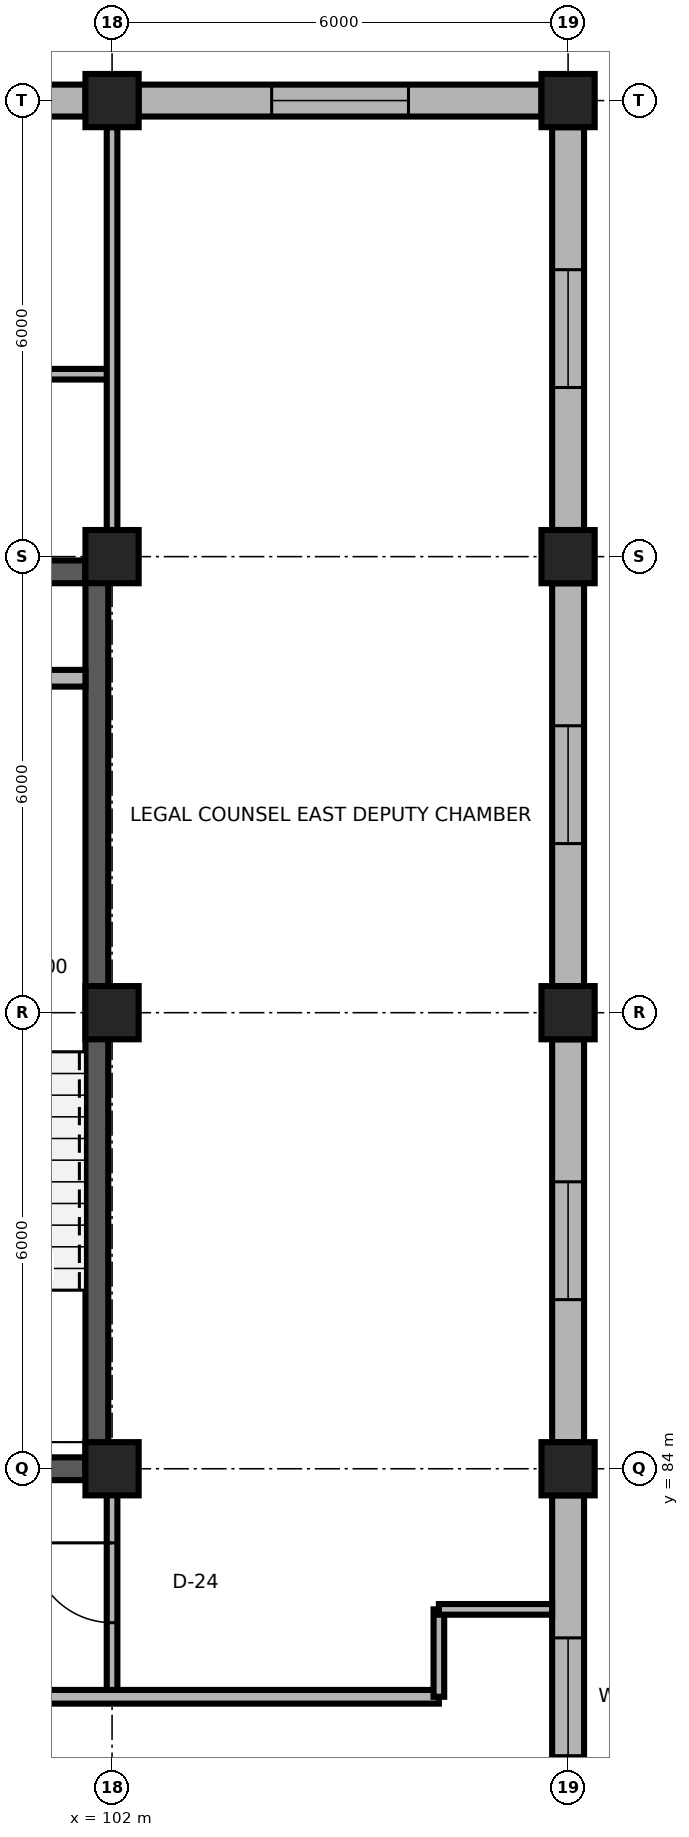
"""IFC4 building model, lengths in metres.
Left out: names, types, materials, properties, quantities, classifications, styles, units other than length and angle.
Written with IfcOpenShell. Run it as: python <this file> out.ifc"""

import sys

from ifc_helpers import new_model, si_unit, direction, frame, frame_2d, origin, origin_2d, place, context, subcontext, project, spatial, rectangle, extrude, element, fill, save


model = new_model("IFC4")
c1 = context("Model", 3, precision=1e-05, world=origin(), true_north=direction((0.0, 1.0)))
c2 = subcontext(c1, "Body", "Model", "MODEL_VIEW")
j1 = project(units=[si_unit("LENGTHUNIT", "METRE"), si_unit("PLANEANGLEUNIT", "RADIAN")], contexts=[c1])
p1 = place(None, origin())
s1 = spatial("IfcSite", under=j1, at=p1, CompositionType="ELEMENT")
p2 = place(p1, origin())
s2 = spatial("IfcBuilding", under=s1, at=p2, CompositionType="ELEMENT")
p3 = place(p2, frame((0.0, 0.0, 60.0)))
s3 = spatial("IfcBuildingStorey", under=s2, at=p3, CompositionType="ELEMENT", Elevation=60.0)
for number, where, z_axis, x_axis in (
    (1, (102.0, 84.0, 0.0), (0.0, 0.0, 1.0), (1.0, 0.0, 0.0)),
    (2, (108.0, 84.0, 0.0), (0.0, 0.0, 1.0), (1.0, 0.0, 0.0)),
    (3, (102.0, 90.0, 0.0), (0.0, 0.0, 1.0), (1.0, 0.0, 0.0)),
    (4, (108.0, 90.0, 0.0), (0.0, 0.0, 1.0), (1.0, 0.0, 0.0)),
    (5, (102.0, 96.0, 0.0), (0.0, 0.0, 1.0), (1.0, 0.0, 0.0)),
    (6, (108.0, 96.0, 0.0), (0.0, 0.0, 1.0), (1.0, 0.0, 0.0)),
    (7, (102.0, 102.0, 0.0), (0.0, 0.0, 1.0), (1.0, 0.0, 0.0)),
    (8, (108.0, 102.0, 0.0), (0.0, 0.0, 1.0), (1.0, 0.0, 0.0)),
):
    element("IfcColumn", number, at=place(p3, frame(where, z_axis=z_axis, x_axis=x_axis)), inside=s3, PredefinedType="COLUMN", context=c2, shape_type="SweptSolid", body=[
        extrude(rectangle(XDim=0.7, YDim=0.7, at=origin_2d()), origin(), (0.0, 0.0, 1.0), 3.9),
    ])
p4 = place(p3, frame((96.35, 102.0, 0.0), z_axis=(0.0, 0.0, 1.0), x_axis=(1.0, 0.0, 0.0)))
e9 = element("IfcWall", 9, at=p4, inside=s3, PredefinedType="SOLIDWALL", context=c2, shape_type="SweptSolid", body=[
    extrude(rectangle(XDim=5.3, YDim=0.42, at=frame_2d((2.65, 0.0))), origin(), (0.0, 0.0, 1.0), 3.32),
])
p5 = place(p4, frame((1.75, 0.0, 0.85)))
e10 = element("IfcOpeningElement", 10, at=p5, cuts=e9, PredefinedType="OPENING", context=c2, shape_type="SweptSolid", body=[
    extrude(rectangle(XDim=1.8, YDim=1.95, at=frame_2d((0.9, 0.975))), frame((0.0, 0.225, 0.0), z_axis=(0.0, -1.0, 0.0), x_axis=(1.0, 0.0, 0.0)), (0.0, 0.0, 1.0), 0.45),
])
p6 = place(p3, frame((102.35, 102.0, 0.0), z_axis=(0.0, 0.0, 1.0), x_axis=(1.0, 0.0, 0.0)))
e11 = element("IfcWall", 11, at=p6, inside=s3, PredefinedType="SOLIDWALL", context=c2, shape_type="SweptSolid", body=[
    extrude(rectangle(XDim=5.3, YDim=0.42, at=frame_2d((2.65, 0.0))), origin(), (0.0, 0.0, 1.0), 3.32),
])
p7 = place(p6, frame((1.75, 0.0, 0.85)))
e12 = element("IfcOpeningElement", 12, at=p7, cuts=e11, PredefinedType="OPENING", context=c2, shape_type="SweptSolid", body=[
    extrude(rectangle(XDim=1.8, YDim=1.95, at=frame_2d((0.9, 0.975))), frame((0.0, 0.225, 0.0), z_axis=(0.0, -1.0, 0.0), x_axis=(1.0, 0.0, 0.0)), (0.0, 0.0, 1.0), 0.45),
])
p8 = place(p3, frame((108.0, 78.35, 0.0), z_axis=(0.0, 0.0, 1.0), x_axis=(0.0, 1.0, 0.0)))
e13 = element("IfcWall", 13, at=p8, inside=s3, PredefinedType="SOLIDWALL", context=c2, shape_type="SweptSolid", body=[
    extrude(rectangle(XDim=5.3, YDim=0.42, at=frame_2d((2.65, 0.0))), origin(), (0.0, 0.0, 1.0), 3.32),
])
p9 = place(p8, frame((1.875, 0.0, 0.85)))
e14 = element("IfcOpeningElement", 14, at=p9, cuts=e13, PredefinedType="OPENING", context=c2, shape_type="SweptSolid", body=[
    extrude(rectangle(XDim=1.55, YDim=1.9, at=frame_2d((0.775, 0.95))), frame((0.0, 0.225, 0.0), z_axis=(0.0, -1.0, 0.0), x_axis=(1.0, 0.0, 0.0)), (0.0, 0.0, 1.0), 0.45),
])
p10 = place(p3, frame((108.0, 84.35, 0.0), z_axis=(0.0, 0.0, 1.0), x_axis=(0.0, 1.0, 0.0)))
e15 = element("IfcWall", 15, at=p10, inside=s3, PredefinedType="SOLIDWALL", context=c2, shape_type="SweptSolid", body=[
    extrude(rectangle(XDim=5.3, YDim=0.42, at=frame_2d((2.65, 0.0))), origin(), (0.0, 0.0, 1.0), 3.32),
])
p11 = place(p10, frame((1.875, 0.0, 0.85)))
e16 = element("IfcOpeningElement", 16, at=p11, cuts=e15, PredefinedType="OPENING", context=c2, shape_type="SweptSolid", body=[
    extrude(rectangle(XDim=1.55, YDim=1.9, at=frame_2d((0.775, 0.95))), frame((0.0, 0.225, 0.0), z_axis=(0.0, -1.0, 0.0), x_axis=(1.0, 0.0, 0.0)), (0.0, 0.0, 1.0), 0.45),
])
p12 = place(p3, frame((108.0, 90.35, 0.0), z_axis=(0.0, 0.0, 1.0), x_axis=(0.0, 1.0, 0.0)))
e17 = element("IfcWall", 17, at=p12, inside=s3, PredefinedType="SOLIDWALL", context=c2, shape_type="SweptSolid", body=[
    extrude(rectangle(XDim=5.3, YDim=0.42, at=frame_2d((2.65, 0.0))), origin(), (0.0, 0.0, 1.0), 3.32),
])
p13 = place(p12, frame((1.875, 0.0, 0.85)))
e18 = element("IfcOpeningElement", 18, at=p13, cuts=e17, PredefinedType="OPENING", context=c2, shape_type="SweptSolid", body=[
    extrude(rectangle(XDim=1.55, YDim=1.9, at=frame_2d((0.775, 0.95))), frame((0.0, 0.225, 0.0), z_axis=(0.0, -1.0, 0.0), x_axis=(1.0, 0.0, 0.0)), (0.0, 0.0, 1.0), 0.45),
])
p14 = place(p3, frame((108.0, 96.35, 0.0), z_axis=(0.0, 0.0, 1.0), x_axis=(0.0, 1.0, 0.0)))
e19 = element("IfcWall", 19, at=p14, inside=s3, PredefinedType="SOLIDWALL", context=c2, shape_type="SweptSolid", body=[
    extrude(rectangle(XDim=5.3, YDim=0.42, at=frame_2d((2.65, 0.0))), origin(), (0.0, 0.0, 1.0), 3.32),
])
p15 = place(p14, frame((1.875, 0.0, 0.85)))
e20 = element("IfcOpeningElement", 20, at=p15, cuts=e19, PredefinedType="OPENING", context=c2, shape_type="SweptSolid", body=[
    extrude(rectangle(XDim=1.55, YDim=1.9, at=frame_2d((0.775, 0.95))), frame((0.0, 0.225, 0.0), z_axis=(0.0, -1.0, 0.0), x_axis=(1.0, 0.0, 0.0)), (0.0, 0.0, 1.0), 0.45),
])
p16 = place(p3, frame((96.35, 84.0, 0.0), z_axis=(0.0, 0.0, 1.0), x_axis=(1.0, 0.0, 0.0)))
e21 = element("IfcWall", 21, at=p16, inside=s3, PredefinedType="SHEAR", context=c2, shape_type="SweptSolid", body=[
    extrude(rectangle(XDim=5.3, YDim=0.3, at=frame_2d((2.65, 0.0))), origin(), (0.0, 0.0, 1.0), 3.66),
])
p17 = place(p16, frame((1.975, 0.0, 0.0)))
e22 = element("IfcOpeningElement", 22, at=p17, cuts=e21, PredefinedType="OPENING", context=c2, shape_type="SweptSolid", body=[
    extrude(rectangle(XDim=1.35, YDim=2.2, at=frame_2d((0.675, 1.1))), frame((0.0, 0.165, 0.0), z_axis=(0.0, -1.0, 0.0), x_axis=(1.0, 0.0, 0.0)), (0.0, 0.0, 1.0), 0.33),
])
p18 = place(p3, frame((96.35, 95.8, 0.0), z_axis=(0.0, 0.0, 1.0), x_axis=(1.0, 0.0, 0.0)))
e23 = element("IfcWall", 23, at=p18, inside=s3, PredefinedType="SHEAR", context=c2, shape_type="SweptSolid", body=[
    extrude(rectangle(XDim=5.3, YDim=0.3, at=frame_2d((2.65, 0.0))), origin(), (0.0, 0.0, 1.0), 3.74),
])
p19 = place(p3, frame((101.8, 84.0, 0.0), z_axis=(0.0, 0.0, 1.0), x_axis=(0.0, 1.0, 0.0)))
e24 = element("IfcWall", 24, at=p19, inside=s3, PredefinedType="SHEAR", context=c2, shape_type="SweptSolid", body=[
    extrude(rectangle(XDim=11.8, YDim=0.3, at=frame_2d((5.9, 0.0))), origin(), (0.0, 0.0, 1.0), 3.74),
])
p20 = place(p3, frame((100.55, 94.4, 0.0), z_axis=(0.0, 0.0, 1.0), x_axis=(1.0, 0.0, 0.0)))
e25 = element("IfcWall", 25, at=p20, inside=s3, PredefinedType="PARTITIONING", context=c2, shape_type="SweptSolid", body=[
    extrude(rectangle(XDim=1.1, YDim=0.22, at=frame_2d((0.55, 0.0))), origin(), (0.0, 0.0, 1.0), 3.74),
])
p21 = place(p3, frame((102.0, 81.05, 0.0), z_axis=(0.0, 0.0, 1.0), x_axis=(0.0, 1.0, 0.0)))
e26 = element("IfcWall", 26, at=p21, inside=s3, PredefinedType="PARTITIONING", context=c2, shape_type="SweptSolid", body=[
    extrude(rectangle(XDim=2.9, YDim=0.14, at=frame_2d((1.45, 0.0))), origin(), (0.0, 0.0, 1.0), 3.449),
])
p22 = place(p21, frame((0.925, 0.0, 0.0)))
e27 = element("IfcOpeningElement", 27, at=p22, cuts=e26, PredefinedType="OPENING", context=c2, shape_type="SweptSolid", body=[
    extrude(rectangle(XDim=1.05, YDim=2.25, at=frame_2d((0.525, 1.125))), frame((0.0, 0.085, 0.0), z_axis=(0.0, -1.0, 0.0), x_axis=(1.0, 0.0, 0.0)), (0.0, 0.0, 1.0), 0.17),
])
p23 = place(p3, frame((96.0, 98.4, 0.0), z_axis=(0.0, 0.0, 1.0), x_axis=(1.0, 0.0, 0.0)))
e28 = element("IfcWall", 28, at=p23, inside=s3, PredefinedType="PARTITIONING", context=c2, shape_type="SweptSolid", body=[
    extrude(rectangle(XDim=6.0, YDim=0.14, at=frame_2d((3.0, 0.0))), origin(), (0.0, 0.0, 1.0), 3.74),
])
p24 = place(p23, frame((2.54, 0.0, 0.0)))
e29 = element("IfcOpeningElement", 29, at=p24, cuts=e28, PredefinedType="OPENING", context=c2, shape_type="SweptSolid", body=[
    extrude(rectangle(XDim=0.92, YDim=2.15, at=frame_2d((0.46, 1.075))), frame((0.0, 0.085, 0.0), z_axis=(0.0, -1.0, 0.0), x_axis=(1.0, 0.0, 0.0)), (0.0, 0.0, 1.0), 0.17),
])
p25 = place(p3, frame((96.0, 81.0, 0.0), z_axis=(0.0, 0.0, 1.0), x_axis=(1.0, 0.0, 0.0)))
e30 = element("IfcWall", 30, at=p25, inside=s3, PredefinedType="PARTITIONING", context=c2, shape_type="SweptSolid", body=[
    extrude(rectangle(XDim=10.3, YDim=0.18, at=frame_2d((5.15, 0.0))), origin(), (0.0, 0.0, 1.0), 3.74),
])
p26 = place(p3, frame((106.3, 81.0, 0.0), z_axis=(0.0, 0.0, 1.0), x_axis=(0.0, 1.0, 0.0)))
e31 = element("IfcWall", 31, at=p26, inside=s3, PredefinedType="PARTITIONING", context=c2, shape_type="SweptSolid", body=[
    extrude(rectangle(XDim=1.15, YDim=0.14, at=frame_2d((0.575, 0.0))), origin(), (0.0, 0.0, 1.0), 3.74),
])
p27 = place(p3, frame((106.3, 82.15, 0.0), z_axis=(0.0, 0.0, 1.0), x_axis=(1.0, 0.0, 0.0)))
e32 = element("IfcWall", 32, at=p27, inside=s3, PredefinedType="PARTITIONING", context=c2, shape_type="SweptSolid", body=[
    extrude(rectangle(XDim=1.49, YDim=0.14, at=frame_2d((0.745, 0.0))), origin(), (0.0, 0.0, 1.0), 3.74),
])
p28 = place(p3, frame((102.0, 96.35, 0.0), z_axis=(0.0, 0.0, 1.0), x_axis=(0.0, 1.0, 0.0)))
e33 = element("IfcWall", 33, at=p28, inside=s3, PredefinedType="PARTITIONING", context=c2, shape_type="SweptSolid", body=[
    extrude(rectangle(XDim=5.3, YDim=0.14, at=frame_2d((2.65, 0.0))), origin(), (0.0, 0.0, 1.0), 3.449),
])
p29 = place(p7, origin())
e34 = element("IfcWindow", 34, at=p29, inside=s3, PartitioningType="SINGLE_PANEL", PredefinedType="WINDOW", context=c2, shape_type="SweptSolid", body=[
    extrude(rectangle(XDim=1.8, YDim=1.95, at=frame_2d((0.9, 0.975))), frame((0.0, 0.03, 0.0), z_axis=(0.0, -1.0, 0.0), x_axis=(1.0, 0.0, 0.0)), (0.0, 0.0, 1.0), 0.06),
])
fill(e12, e34)
p30 = place(p9, origin())
e35 = element("IfcWindow", 35, at=p30, inside=s3, PartitioningType="SINGLE_PANEL", PredefinedType="WINDOW", context=c2, shape_type="SweptSolid", body=[
    extrude(rectangle(XDim=1.55, YDim=1.9, at=frame_2d((0.775, 0.95))), frame((0.0, 0.03, 0.0), z_axis=(0.0, -1.0, 0.0), x_axis=(1.0, 0.0, 0.0)), (0.0, 0.0, 1.0), 0.06),
])
fill(e14, e35)
p31 = place(p11, origin())
e36 = element("IfcWindow", 36, at=p31, inside=s3, PartitioningType="SINGLE_PANEL", PredefinedType="WINDOW", context=c2, shape_type="SweptSolid", body=[
    extrude(rectangle(XDim=1.55, YDim=1.9, at=frame_2d((0.775, 0.95))), frame((0.0, 0.03, 0.0), z_axis=(0.0, -1.0, 0.0), x_axis=(1.0, 0.0, 0.0)), (0.0, 0.0, 1.0), 0.06),
])
fill(e16, e36)
p32 = place(p13, origin())
e37 = element("IfcWindow", 37, at=p32, inside=s3, PartitioningType="SINGLE_PANEL", PredefinedType="WINDOW", context=c2, shape_type="SweptSolid", body=[
    extrude(rectangle(XDim=1.55, YDim=1.9, at=frame_2d((0.775, 0.95))), frame((0.0, 0.03, 0.0), z_axis=(0.0, -1.0, 0.0), x_axis=(1.0, 0.0, 0.0)), (0.0, 0.0, 1.0), 0.06),
])
fill(e18, e37)
p33 = place(p15, origin())
e38 = element("IfcWindow", 38, at=p33, inside=s3, PartitioningType="SINGLE_PANEL", PredefinedType="WINDOW", context=c2, shape_type="SweptSolid", body=[
    extrude(rectangle(XDim=1.55, YDim=1.9, at=frame_2d((0.775, 0.95))), frame((0.0, 0.03, 0.0), z_axis=(0.0, -1.0, 0.0), x_axis=(1.0, 0.0, 0.0)), (0.0, 0.0, 1.0), 0.06),
])
fill(e20, e38)
p34 = place(p22, origin())
e39 = element("IfcDoor", 39, at=p34, inside=s3, OperationType="SINGLE_SWING_RIGHT", PredefinedType="DOOR", context=c2, shape_type="SweptSolid", body=[
    extrude(rectangle(XDim=1.05, YDim=2.25, at=frame_2d((0.525, 1.125))), frame((0.0, 0.025, 0.0), z_axis=(0.0, -1.0, 0.0), x_axis=(1.0, 0.0, 0.0)), (0.0, 0.0, 1.0), 0.05),
])
fill(e27, e39)
save(model, sys.argv[1])
